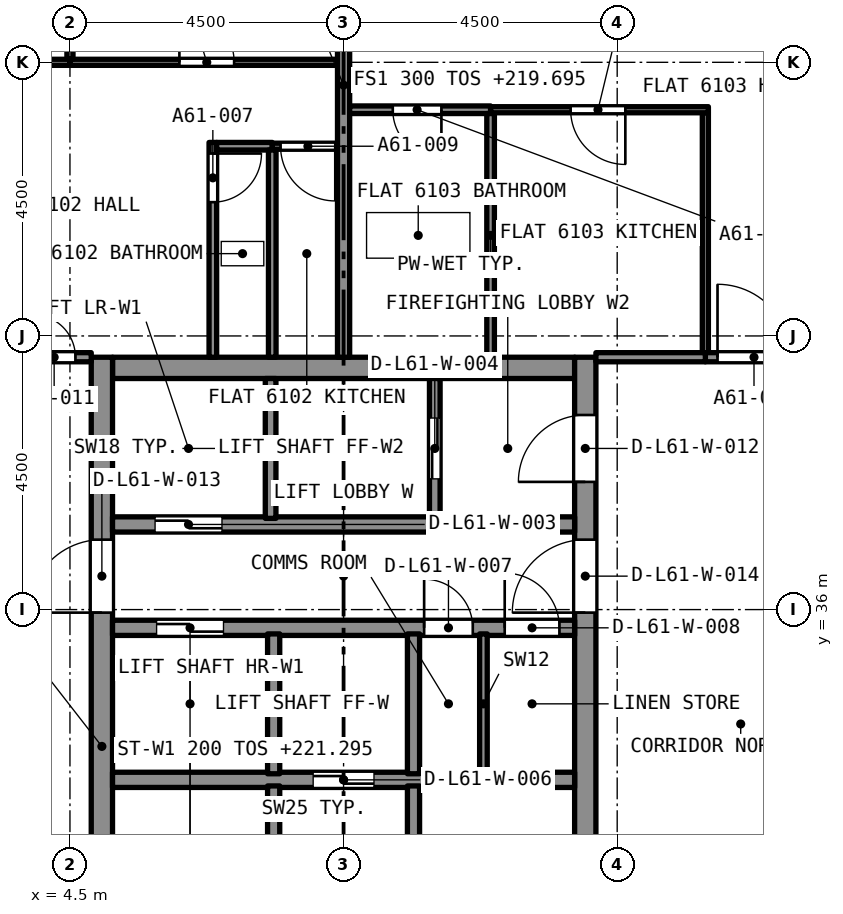
"""IFC4 building model, lengths in metres.
Left out: names, types, materials, properties, quantities, classifications, styles, units other than length and angle.
Written with IfcOpenShell. Run it as: python <this file> out.ifc"""

import sys

from ifc_helpers import new_model, si_unit, direction, frame, frame_2d, origin, place, context, subcontext, project, spatial, rectangle, extrude, element, fill, save


model = new_model("IFC4")
c1 = context("Model", 3, precision=1e-05, world=origin(), true_north=direction((0.0, 1.0)))
c2 = subcontext(c1, "Body", "Model", "MODEL_VIEW")
j1 = project(units=[si_unit("LENGTHUNIT", "METRE"), si_unit("PLANEANGLEUNIT", "RADIAN")], contexts=[c1])
p1 = place(None, origin())
s1 = spatial("IfcSite", under=j1, at=p1, CompositionType="ELEMENT")
p2 = place(p1, origin())
s2 = spatial("IfcBuilding", under=s1, at=p2, CompositionType="ELEMENT")
p3 = place(p2, frame((0.0, 0.0, 219.695)))
s3 = spatial("IfcBuildingStorey", under=s2, at=p3, CompositionType="ELEMENT", Elevation=219.695)
p4 = place(p3, frame((5.2, 39.975, 0.0), z_axis=(0.0, 0.0, 1.0), x_axis=(1.0, 0.0, 0.0)))
e1 = element("IfcWall", 1, at=p4, inside=s3, PredefinedType="SOLIDWALL", context=c2, shape_type="SweptSolid", body=[
    extrude(rectangle(XDim=7.6, YDim=0.35, at=frame_2d((3.8, 0.0))), origin(), (0.0, 0.0, 1.0), 3.2),
])
p5 = place(p3, frame((5.025, 27.35, 0.0), z_axis=(0.0, 0.0, 1.0), x_axis=(0.0, 1.0, 0.0)))
e2 = element("IfcWall", 2, at=p5, inside=s3, PredefinedType="SOLIDWALL", context=c2, shape_type="SweptSolid", body=[
    extrude(rectangle(XDim=12.8, YDim=0.35, at=frame_2d((6.4, 0.0))), origin(), (0.0, 0.0, 1.0), 3.2),
])
p6 = place(p5, frame((8.6, 0.0, 0.0)))
e3 = element("IfcOpeningElement", 3, at=p6, cuts=e2, PredefinedType="OPENING", context=c2, shape_type="SweptSolid", body=[
    extrude(rectangle(XDim=1.2, YDim=2.1, at=frame_2d((0.6, 1.05))), frame((0.0, 0.185, 0.0), z_axis=(0.0, -1.0, 0.0), x_axis=(1.0, 0.0, 0.0)), (0.0, 0.0, 1.0), 0.37),
])
p7 = place(p3, frame((12.975, 27.35, 0.0), z_axis=(0.0, 0.0, 1.0), x_axis=(0.0, 1.0, 0.0)))
e4 = element("IfcWall", 4, at=p7, inside=s3, PredefinedType="SOLIDWALL", context=c2, shape_type="SweptSolid", body=[
    extrude(rectangle(XDim=12.8, YDim=0.35, at=frame_2d((6.4, 0.0))), origin(), (0.0, 0.0, 1.0), 3.2),
])
p8 = place(p7, frame((10.75, 0.0, 0.0)))
e5 = element("IfcOpeningElement", 5, at=p8, cuts=e4, PredefinedType="OPENING", context=c2, shape_type="SweptSolid", body=[
    extrude(rectangle(XDim=1.1, YDim=2.1, at=frame_2d((0.55, 1.05))), frame((0.0, 0.185, 0.0), z_axis=(0.0, -1.0, 0.0), x_axis=(1.0, 0.0, 0.0)), (0.0, 0.0, 1.0), 0.37),
])
p9 = place(p7, frame((8.6, 0.0, 0.0)))
e6 = element("IfcOpeningElement", 6, at=p9, cuts=e4, PredefinedType="OPENING", context=c2, shape_type="SweptSolid", body=[
    extrude(rectangle(XDim=1.2, YDim=2.1, at=frame_2d((0.6, 1.05))), frame((0.0, 0.185, 0.0), z_axis=(0.0, -1.0, 0.0), x_axis=(1.0, 0.0, 0.0)), (0.0, 0.0, 1.0), 0.37),
])
p10 = place(p3, frame((6.85, 43.683, 0.0), z_axis=(0.0, 0.0, 1.0), x_axis=(0.0, -1.0, 0.0)))
e7 = element("IfcWall", 7, at=p10, inside=s3, PredefinedType="PARTITIONING", context=c2, shape_type="SweptSolid", body=[
    extrude(rectangle(XDim=3.533, YDim=0.125, at=frame_2d((1.766, 0.0))), origin(), (0.0, 0.0, 1.0), 2.9),
])
p11 = place(p10, frame((0.183, 0.0, 0.0)))
e8 = element("IfcOpeningElement", 8, at=p11, cuts=e7, PredefinedType="OPENING", context=c2, shape_type="SweptSolid", body=[
    extrude(rectangle(XDim=0.8, YDim=2.1, at=frame_2d((0.4, 1.05))), frame((0.0, 0.073, 0.0), z_axis=(0.0, -1.0, 0.0), x_axis=(1.0, 0.0, 0.0)), (0.0, 0.0, 1.0), 0.145),
])
p12 = place(p3, frame((6.913, 43.62, 0.0), z_axis=(0.0, 0.0, 1.0), x_axis=(1.0, 0.0, 0.0)))
e9 = element("IfcWall", 9, at=p12, inside=s3, PredefinedType="PARTITIONING", context=c2, shape_type="SweptSolid", body=[
    extrude(rectangle(XDim=0.915, YDim=0.125, at=frame_2d((0.458, 0.0))), origin(), (0.0, 0.0, 1.0), 2.9),
])
p13 = place(p3, frame((7.827, 40.15, 0.0), z_axis=(0.0, 0.0, 1.0), x_axis=(0.0, 1.0, 0.0)))
e10 = element("IfcWall", 10, at=p13, inside=s3, PredefinedType="PARTITIONING", context=c2, shape_type="SweptSolid", body=[
    extrude(rectangle(XDim=3.408, YDim=0.125, at=frame_2d((1.704, 0.0))), origin(), (0.0, 0.0, 1.0), 2.9),
])
p14 = place(p3, frame((4.5, 45.0, 0.0), z_axis=(0.0, 0.0, 1.0), x_axis=(1.0, 0.0, 0.0)))
e11 = element("IfcWall", 11, at=p14, inside=s3, PredefinedType="PARTITIONING", context=c2, shape_type="SweptSolid", body=[
    extrude(rectangle(XDim=4.4, YDim=0.1, at=frame_2d((2.2, 0.0))), origin(), (0.0, 0.0, 1.0), 2.9),
])
p15 = place(p14, frame((1.8, 0.0, 0.0)))
e12 = element("IfcOpeningElement", 12, at=p15, cuts=e11, PredefinedType="OPENING", context=c2, shape_type="SweptSolid", body=[
    extrude(rectangle(XDim=0.9, YDim=2.1, at=frame_2d((0.45, 1.05))), frame((0.0, 0.06, 0.0), z_axis=(0.0, -1.0, 0.0), x_axis=(1.0, 0.0, 0.0)), (0.0, 0.0, 1.0), 0.12),
])
p16 = place(p3, frame((4.5, 45.05, 0.0), z_axis=(0.0, 0.0, 1.0), x_axis=(0.0, 1.0, 0.0)))
e13 = element("IfcWall", 13, at=p16, inside=s3, PredefinedType="PARTITIONING", context=c2, shape_type="SweptSolid", body=[
    extrude(rectangle(XDim=4.017, YDim=0.1, at=frame_2d((2.009, 0.0))), origin(), (0.0, 0.0, 1.0), 2.9),
])
p17 = place(p3, frame((8.9, 43.62, 0.0), z_axis=(0.0, 0.0, 1.0), x_axis=(-1.0, 0.0, 0.0)))
e14 = element("IfcWall", 14, at=p17, inside=s3, PredefinedType="PARTITIONING", context=c2, shape_type="SweptSolid", body=[
    extrude(rectangle(XDim=1.073, YDim=0.1, at=frame_2d((0.536, 0.0))), origin(), (0.0, 0.0, 1.0), 2.9),
])
p18 = place(p17, frame((0.036, 0.0, 0.0)))
e15 = element("IfcOpeningElement", 15, at=p18, cuts=e14, PredefinedType="OPENING", context=c2, shape_type="SweptSolid", body=[
    extrude(rectangle(XDim=0.9, YDim=2.1, at=frame_2d((0.45, 1.05))), frame((0.0, 0.06, 0.0), z_axis=(0.0, -1.0, 0.0), x_axis=(1.0, 0.0, 0.0)), (0.0, 0.0, 1.0), 0.12),
])
p19 = place(p3, frame((0.433, 45.0, 0.0), z_axis=(0.0, 0.0, 1.0), x_axis=(1.0, 0.0, 0.0)))
e16 = element("IfcWall", 16, at=p19, inside=s3, PredefinedType="PARTITIONING", context=c2, shape_type="SweptSolid", body=[
    extrude(rectangle(XDim=4.067, YDim=0.1, at=frame_2d((2.034, 0.0))), origin(), (0.0, 0.0, 1.0), 2.9),
])
p20 = place(p19, frame((1.517, 0.0, 0.0)))
e17 = element("IfcOpeningElement", 17, at=p20, cuts=e16, PredefinedType="OPENING", context=c2, shape_type="SweptSolid", body=[
    extrude(rectangle(XDim=1.0, YDim=2.1, at=frame_2d((0.5, 1.05))), frame((0.0, 0.06, 0.0), z_axis=(0.0, -1.0, 0.0), x_axis=(1.0, 0.0, 0.0)), (0.0, 0.0, 1.0), 0.12),
])
p21 = place(p3, frame((3.65, 40.15, 0.0), z_axis=(0.0, 0.0, 1.0), x_axis=(1.0, 0.0, 0.0)))
e18 = element("IfcWall", 18, at=p21, inside=s3, PredefinedType="PARTITIONING", context=c2, shape_type="SweptSolid", body=[
    extrude(rectangle(XDim=1.2, YDim=0.15, at=frame_2d((0.6, 0.0))), origin(), (0.0, 0.0, 1.0), 2.9),
])
p22 = place(p21, frame((0.24, 0.0, 0.0)))
e19 = element("IfcOpeningElement", 19, at=p22, cuts=e18, PredefinedType="OPENING", context=c2, shape_type="SweptSolid", body=[
    extrude(rectangle(XDim=0.7, YDim=2.1, at=frame_2d((0.35, 1.05))), frame((0.0, 0.085, 0.0), z_axis=(0.0, -1.0, 0.0), x_axis=(1.0, 0.0, 0.0)), (0.0, 0.0, 1.0), 0.17),
])
p23 = place(p3, frame((9.0, 40.15, 0.0), z_axis=(0.0, 0.0, 1.0), x_axis=(0.0, 1.0, 0.0)))
e20 = element("IfcWall", 20, at=p23, inside=s3, PredefinedType="PARTITIONING", context=c2, shape_type="SweptSolid", body=[
    extrude(rectangle(XDim=8.95, YDim=0.2, at=frame_2d((4.475, 0.0))), origin(), (0.0, 0.0, 1.0), 2.9),
])
p24 = place(p3, frame((11.418, 44.22, 0.0), z_axis=(0.0, 0.0, 1.0), x_axis=(-1.0, 0.0, 0.0)))
e21 = element("IfcWall", 21, at=p24, inside=s3, PredefinedType="PARTITIONING", context=c2, shape_type="SweptSolid", body=[
    extrude(rectangle(XDim=2.318, YDim=0.125, at=frame_2d((1.159, 0.0))), origin(), (0.0, 0.0, 1.0), 2.9),
])
p25 = place(p24, frame((0.809, 0.0, 0.0)))
e22 = element("IfcOpeningElement", 22, at=p25, cuts=e21, PredefinedType="OPENING", context=c2, shape_type="SweptSolid", body=[
    extrude(rectangle(XDim=0.8, YDim=2.1, at=frame_2d((0.4, 1.05))), frame((0.0, 0.073, 0.0), z_axis=(0.0, -1.0, 0.0), x_axis=(1.0, 0.0, 0.0)), (0.0, 0.0, 1.0), 0.145),
])
p26 = place(p3, frame((11.418, 40.15, 0.0), z_axis=(0.0, 0.0, 1.0), x_axis=(0.0, 1.0, 0.0)))
e23 = element("IfcWall", 23, at=p26, inside=s3, PredefinedType="PARTITIONING", context=c2, shape_type="SweptSolid", body=[
    extrude(rectangle(XDim=4.008, YDim=0.125, at=frame_2d((2.004, 0.0))), origin(), (0.0, 0.0, 1.0), 2.9),
])
p27 = place(p3, frame((14.95, 40.225, 0.0), z_axis=(0.0, 0.0, 1.0), x_axis=(0.0, 1.0, 0.0)))
e24 = element("IfcWall", 24, at=p27, inside=s3, PredefinedType="PARTITIONING", context=c2, shape_type="SweptSolid", body=[
    extrude(rectangle(XDim=3.945, YDim=0.1, at=frame_2d((1.972, 0.0))), origin(), (0.0, 0.0, 1.0), 2.9),
])
p28 = place(p3, frame((15.0, 44.22, 0.0), z_axis=(0.0, 0.0, 1.0), x_axis=(-1.0, 0.0, 0.0)))
e25 = element("IfcWall", 25, at=p28, inside=s3, PredefinedType="PARTITIONING", context=c2, shape_type="SweptSolid", body=[
    extrude(rectangle(XDim=3.582, YDim=0.1, at=frame_2d((1.791, 0.0))), origin(), (0.0, 0.0, 1.0), 2.9),
])
p29 = place(p28, frame((1.366, 0.0, 0.0)))
e26 = element("IfcOpeningElement", 26, at=p29, cuts=e25, PredefinedType="OPENING", context=c2, shape_type="SweptSolid", body=[
    extrude(rectangle(XDim=0.9, YDim=2.1, at=frame_2d((0.45, 1.05))), frame((0.0, 0.06, 0.0), z_axis=(0.0, -1.0, 0.0), x_axis=(1.0, 0.0, 0.0)), (0.0, 0.0, 1.0), 0.12),
])
p30 = place(p3, frame((14.95, 40.15, 0.0), z_axis=(0.0, 0.0, 1.0), x_axis=(1.0, 0.0, 0.0)))
e27 = element("IfcWall", 27, at=p30, inside=s3, PredefinedType="PARTITIONING", context=c2, shape_type="SweptSolid", body=[
    extrude(rectangle(XDim=2.65, YDim=0.15, at=frame_2d((1.325, 0.0))), origin(), (0.0, 0.0, 1.0), 2.9),
])
p31 = place(p30, frame((0.2, 0.0, 0.0)))
e28 = element("IfcOpeningElement", 28, at=p31, cuts=e27, PredefinedType="OPENING", context=c2, shape_type="SweptSolid", body=[
    extrude(rectangle(XDim=1.2, YDim=2.4, at=frame_2d((0.6, 1.2))), frame((0.0, 0.085, 0.0), z_axis=(0.0, -1.0, 0.0), x_axis=(1.0, 0.0, 0.0)), (0.0, 0.0, 1.0), 0.17),
])
p32 = place(p3, frame((13.15, 40.15, 0.0), z_axis=(0.0, 0.0, 1.0), x_axis=(1.0, 0.0, 0.0)))
e29 = element("IfcWall", 29, at=p32, inside=s3, PredefinedType="PARTITIONING", context=c2, shape_type="SweptSolid", body=[
    extrude(rectangle(XDim=1.8, YDim=0.15, at=frame_2d((0.9, 0.0))), origin(), (0.0, 0.0, 1.0), 2.9),
])
p33 = place(p3, frame((5.2, 33.2, 0.0), z_axis=(0.0, 0.0, 1.0), x_axis=(1.0, 0.0, 0.0)))
e30 = element("IfcWall", 30, at=p33, inside=s3, PredefinedType="SOLIDWALL", context=c2, shape_type="SweptSolid", body=[
    extrude(rectangle(XDim=7.6, YDim=0.25, at=frame_2d((3.8, 0.0))), origin(), (0.0, 0.0, 1.0), 2.9),
])
p34 = place(p33, frame((3.3, 0.0, 0.0)))
e31 = element("IfcOpeningElement", 31, at=p34, cuts=e30, PredefinedType="OPENING", context=c2, shape_type="SweptSolid", body=[
    extrude(rectangle(XDim=1.0, YDim=2.1, at=frame_2d((0.5, 1.05))), frame((0.0, 0.135, 0.0), z_axis=(0.0, -1.0, 0.0), x_axis=(1.0, 0.0, 0.0)), (0.0, 0.0, 1.0), 0.27),
])
p35 = place(p3, frame((5.2, 35.7, 0.0), z_axis=(0.0, 0.0, 1.0), x_axis=(1.0, 0.0, 0.0)))
e32 = element("IfcWall", 32, at=p35, inside=s3, PredefinedType="SOLIDWALL", context=c2, shape_type="SweptSolid", body=[
    extrude(rectangle(XDim=7.6, YDim=0.25, at=frame_2d((3.8, 0.0))), origin(), (0.0, 0.0, 1.0), 2.9),
])
p36 = place(p35, frame((0.725, 0.0, 0.0)))
e33 = element("IfcOpeningElement", 33, at=p36, cuts=e32, PredefinedType="OPENING", context=c2, shape_type="SweptSolid", body=[
    extrude(rectangle(XDim=1.1, YDim=2.4, at=frame_2d((0.55, 1.2))), frame((0.0, 0.135, 0.0), z_axis=(0.0, -1.0, 0.0), x_axis=(1.0, 0.0, 0.0)), (0.0, 0.0, 1.0), 0.27),
])
p37 = place(p35, frame((5.125, 0.0, 0.0)))
e34 = element("IfcOpeningElement", 34, at=p37, cuts=e32, PredefinedType="OPENING", context=c2, shape_type="SweptSolid", body=[
    extrude(rectangle(XDim=0.8, YDim=2.1, at=frame_2d((0.4, 1.05))), frame((0.0, 0.135, 0.0), z_axis=(0.0, -1.0, 0.0), x_axis=(1.0, 0.0, 0.0)), (0.0, 0.0, 1.0), 0.27),
])
p38 = place(p35, frame((6.45, 0.0, 0.0)))
e35 = element("IfcOpeningElement", 35, at=p38, cuts=e32, PredefinedType="OPENING", context=c2, shape_type="SweptSolid", body=[
    extrude(rectangle(XDim=0.9, YDim=2.1, at=frame_2d((0.45, 1.05))), frame((0.0, 0.135, 0.0), z_axis=(0.0, -1.0, 0.0), x_axis=(1.0, 0.0, 0.0)), (0.0, 0.0, 1.0), 0.27),
])
p39 = place(p3, frame((5.2, 37.4, 0.0), z_axis=(0.0, 0.0, 1.0), x_axis=(1.0, 0.0, 0.0)))
e36 = element("IfcWall", 36, at=p39, inside=s3, PredefinedType="SOLIDWALL", context=c2, shape_type="SweptSolid", body=[
    extrude(rectangle(XDim=7.6, YDim=0.25, at=frame_2d((3.8, 0.0))), origin(), (0.0, 0.0, 1.0), 2.9),
])
p40 = place(p39, frame((0.7, 0.0, 0.0)))
e37 = element("IfcOpeningElement", 37, at=p40, cuts=e36, PredefinedType="OPENING", context=c2, shape_type="SweptSolid", body=[
    extrude(rectangle(XDim=1.1, YDim=2.4, at=frame_2d((0.55, 1.2))), frame((0.0, 0.135, 0.0), z_axis=(0.0, -1.0, 0.0), x_axis=(1.0, 0.0, 0.0)), (0.0, 0.0, 1.0), 0.27),
])
p41 = place(p3, frame((7.85, 27.7, 0.0), z_axis=(0.0, 0.0, 1.0), x_axis=(0.0, 1.0, 0.0)))
e38 = element("IfcWall", 38, at=p41, inside=s3, PredefinedType="SOLIDWALL", context=c2, shape_type="SweptSolid", body=[
    extrude(rectangle(XDim=5.4, YDim=0.2, at=frame_2d((2.7, 0.0))), origin(), (0.0, 0.0, 1.0), 2.9),
])
p42 = place(p41, frame((0.2, 0.0, 0.0)))
e39 = element("IfcOpeningElement", 39, at=p42, cuts=e38, PredefinedType="OPENING", context=c2, shape_type="SweptSolid", body=[
    extrude(rectangle(XDim=0.9, YDim=2.1, at=frame_2d((0.45, 1.05))), frame((0.0, 0.11, 0.0), z_axis=(0.0, -1.0, 0.0), x_axis=(1.0, 0.0, 0.0)), (0.0, 0.0, 1.0), 0.22),
])
p43 = place(p3, frame((10.15, 27.7, 0.0), z_axis=(0.0, 0.0, 1.0), x_axis=(0.0, 1.0, 0.0)))
e40 = element("IfcWall", 40, at=p43, inside=s3, PredefinedType="SOLIDWALL", context=c2, shape_type="SweptSolid", body=[
    extrude(rectangle(XDim=5.4, YDim=0.2, at=frame_2d((2.7, 0.0))), origin(), (0.0, 0.0, 1.0), 2.9),
])
p44 = place(p43, frame((0.2, 0.0, 0.0)))
e41 = element("IfcOpeningElement", 41, at=p44, cuts=e40, PredefinedType="OPENING", context=c2, shape_type="SweptSolid", body=[
    extrude(rectangle(XDim=0.9, YDim=2.1, at=frame_2d((0.45, 1.05))), frame((0.0, 0.11, 0.0), z_axis=(0.0, -1.0, 0.0), x_axis=(1.0, 0.0, 0.0)), (0.0, 0.0, 1.0), 0.22),
])
for number, where, z_axis, x_axis in (
    (42, (7.85, 33.3, 0.0), (0.0, 0.0, 1.0), (0.0, 1.0, 0.0)),
    (43, (10.15, 33.3, 0.0), (0.0, 0.0, 1.0), (0.0, 1.0, 0.0)),
):
    element("IfcWall", number, at=place(p3, frame(where, z_axis=z_axis, x_axis=x_axis)), inside=s3, PredefinedType="SOLIDWALL", context=c2, shape_type="SweptSolid", body=[
        extrude(rectangle(XDim=2.3, YDim=0.2, at=frame_2d((1.15, 0.0))), origin(), (0.0, 0.0, 1.0), 2.9),
    ])
p45 = place(p3, frame((7.8, 37.5, 0.0), z_axis=(0.0, 0.0, 1.0), x_axis=(0.0, 1.0, 0.0)))
e44 = element("IfcWall", 44, at=p45, inside=s3, PredefinedType="SOLIDWALL", context=c2, shape_type="SweptSolid", body=[
    extrude(rectangle(XDim=2.3, YDim=0.175, at=frame_2d((1.15, 0.0))), origin(), (0.0, 0.0, 1.0), 2.9),
])
p46 = place(p3, frame((10.5, 37.5, 0.0), z_axis=(0.0, 0.0, 1.0), x_axis=(0.0, 1.0, 0.0)))
e45 = element("IfcWall", 45, at=p46, inside=s3, PredefinedType="SOLIDWALL", context=c2, shape_type="SweptSolid", body=[
    extrude(rectangle(XDim=2.3, YDim=0.175, at=frame_2d((1.15, 0.0))), origin(), (0.0, 0.0, 1.0), 2.9),
])
p47 = place(p46, frame((0.65, 0.0, 0.0)))
e46 = element("IfcOpeningElement", 46, at=p47, cuts=e45, PredefinedType="OPENING", context=c2, shape_type="SweptSolid", body=[
    extrude(rectangle(XDim=1.0, YDim=2.1, at=frame_2d((0.5, 1.05))), frame((0.0, 0.097, 0.0), z_axis=(0.0, -1.0, 0.0), x_axis=(1.0, 0.0, 0.0)), (0.0, 0.0, 1.0), 0.195),
])
p48 = place(p3, frame((11.3, 33.3, 0.0), z_axis=(0.0, 0.0, 1.0), x_axis=(0.0, 1.0, 0.0)))
e47 = element("IfcWall", 47, at=p48, inside=s3, PredefinedType="PARTITIONING", context=c2, shape_type="SweptSolid", body=[
    extrude(rectangle(XDim=2.3, YDim=0.125, at=frame_2d((1.15, 0.0))), origin(), (0.0, 0.0, 1.0), 2.9),
])
p49 = place(p11, origin())
e48 = element("IfcDoor", 48, at=p49, inside=s3, OperationType="SINGLE_SWING_LEFT", PredefinedType="DOOR", context=c2, shape_type="SweptSolid", body=[
    extrude(rectangle(XDim=0.8, YDim=2.1, at=frame_2d((0.4, 1.05))), frame((0.0, 0.025, 0.0), z_axis=(0.0, -1.0, 0.0), x_axis=(1.0, 0.0, 0.0)), (0.0, 0.0, 1.0), 0.05),
])
fill(e8, e48)
p50 = place(p15, origin())
e49 = element("IfcDoor", 49, at=p50, inside=s3, OperationType="SINGLE_SWING_RIGHT", PredefinedType="DOOR", context=c2, shape_type="SweptSolid", body=[
    extrude(rectangle(XDim=0.9, YDim=2.1, at=frame_2d((0.45, 1.05))), frame((0.0, 0.025, 0.0), z_axis=(0.0, -1.0, 0.0), x_axis=(1.0, 0.0, 0.0)), (0.0, 0.0, 1.0), 0.05),
])
fill(e12, e49)
p51 = place(p18, origin())
e50 = element("IfcDoor", 50, at=p51, inside=s3, OperationType="SINGLE_SWING_LEFT", PredefinedType="DOOR", context=c2, shape_type="SweptSolid", body=[
    extrude(rectangle(XDim=0.9, YDim=2.1, at=frame_2d((0.45, 1.05))), frame((0.0, 0.025, 0.0), z_axis=(0.0, -1.0, 0.0), x_axis=(1.0, 0.0, 0.0)), (0.0, 0.0, 1.0), 0.05),
])
fill(e15, e50)
p52 = place(p22, origin())
e51 = element("IfcDoor", 51, at=p52, inside=s3, OperationType="SINGLE_SWING_LEFT", PredefinedType="DOOR", context=c2, shape_type="SweptSolid", body=[
    extrude(rectangle(XDim=0.7, YDim=2.1, at=frame_2d((0.35, 1.05))), frame((0.0, 0.025, 0.0), z_axis=(0.0, -1.0, 0.0), x_axis=(1.0, 0.0, 0.0)), (0.0, 0.0, 1.0), 0.05),
])
fill(e19, e51)
p53 = place(p25, origin())
e52 = element("IfcDoor", 52, at=p53, inside=s3, OperationType="SINGLE_SWING_RIGHT", PredefinedType="DOOR", context=c2, shape_type="SweptSolid", body=[
    extrude(rectangle(XDim=0.8, YDim=2.1, at=frame_2d((0.4, 1.05))), frame((0.0, 0.025, 0.0), z_axis=(0.0, -1.0, 0.0), x_axis=(1.0, 0.0, 0.0)), (0.0, 0.0, 1.0), 0.05),
])
fill(e22, e52)
p54 = place(p29, origin())
e53 = element("IfcDoor", 53, at=p54, inside=s3, OperationType="SINGLE_SWING_RIGHT", PredefinedType="DOOR", context=c2, shape_type="SweptSolid", body=[
    extrude(rectangle(XDim=0.9, YDim=2.1, at=frame_2d((0.45, 1.05))), frame((0.0, 0.025, 0.0), z_axis=(0.0, -1.0, 0.0), x_axis=(1.0, 0.0, 0.0)), (0.0, 0.0, 1.0), 0.05),
])
fill(e26, e53)
p55 = place(p31, origin())
e54 = element("IfcDoor", 54, at=p55, inside=s3, OperationType="SINGLE_SWING_LEFT", PredefinedType="DOOR", context=c2, shape_type="SweptSolid", body=[
    extrude(rectangle(XDim=1.2, YDim=2.4, at=frame_2d((0.6, 1.2))), frame((0.0, 0.025, 0.0), z_axis=(0.0, -1.0, 0.0), x_axis=(1.0, 0.0, 0.0)), (0.0, 0.0, 1.0), 0.05),
])
fill(e28, e54)
p56 = place(p40, origin())
e55 = element("IfcDoor", 55, at=p56, inside=s3, OperationType="SLIDING_TO_LEFT", PredefinedType="DOOR", context=c2, shape_type="SweptSolid", body=[
    extrude(rectangle(XDim=1.1, YDim=2.4, at=frame_2d((0.55, 1.2))), frame((0.0, 0.025, 0.0), z_axis=(0.0, -1.0, 0.0), x_axis=(1.0, 0.0, 0.0)), (0.0, 0.0, 1.0), 0.05),
])
fill(e37, e55)
p57 = place(p47, origin())
e56 = element("IfcDoor", 56, at=p57, inside=s3, OperationType="SLIDING_TO_LEFT", PredefinedType="DOOR", context=c2, shape_type="SweptSolid", body=[
    extrude(rectangle(XDim=1.0, YDim=2.1, at=frame_2d((0.5, 1.05))), frame((0.0, 0.025, 0.0), z_axis=(0.0, -1.0, 0.0), x_axis=(1.0, 0.0, 0.0)), (0.0, 0.0, 1.0), 0.05),
])
fill(e46, e56)
p58 = place(p36, origin())
e57 = element("IfcDoor", 57, at=p58, inside=s3, OperationType="SLIDING_TO_LEFT", PredefinedType="DOOR", context=c2, shape_type="SweptSolid", body=[
    extrude(rectangle(XDim=1.1, YDim=2.4, at=frame_2d((0.55, 1.2))), frame((0.0, 0.025, 0.0), z_axis=(0.0, -1.0, 0.0), x_axis=(1.0, 0.0, 0.0)), (0.0, 0.0, 1.0), 0.05),
])
fill(e33, e57)
p59 = place(p34, origin())
e58 = element("IfcDoor", 58, at=p59, inside=s3, OperationType="SLIDING_TO_LEFT", PredefinedType="DOOR", context=c2, shape_type="SweptSolid", body=[
    extrude(rectangle(XDim=1.0, YDim=2.1, at=frame_2d((0.5, 1.05))), frame((0.0, 0.025, 0.0), z_axis=(0.0, -1.0, 0.0), x_axis=(1.0, 0.0, 0.0)), (0.0, 0.0, 1.0), 0.05),
])
fill(e31, e58)
p60 = place(p37, origin())
e59 = element("IfcDoor", 59, at=p60, inside=s3, OperationType="SINGLE_SWING_LEFT", PredefinedType="DOOR", context=c2, shape_type="SweptSolid", body=[
    extrude(rectangle(XDim=0.8, YDim=2.1, at=frame_2d((0.4, 1.05))), frame((0.0, 0.025, 0.0), z_axis=(0.0, -1.0, 0.0), x_axis=(1.0, 0.0, 0.0)), (0.0, 0.0, 1.0), 0.05),
])
fill(e34, e59)
p61 = place(p38, origin())
e60 = element("IfcDoor", 60, at=p61, inside=s3, OperationType="SINGLE_SWING_LEFT", PredefinedType="DOOR", context=c2, shape_type="SweptSolid", body=[
    extrude(rectangle(XDim=0.9, YDim=2.1, at=frame_2d((0.45, 1.05))), frame((0.0, 0.025, 0.0), z_axis=(0.0, -1.0, 0.0), x_axis=(1.0, 0.0, 0.0)), (0.0, 0.0, 1.0), 0.05),
])
fill(e35, e60)
p62 = place(p8, origin())
e61 = element("IfcDoor", 61, at=p62, inside=s3, OperationType="SINGLE_SWING_LEFT", PredefinedType="DOOR", context=c2, shape_type="SweptSolid", body=[
    extrude(rectangle(XDim=1.1, YDim=2.1, at=frame_2d((0.55, 1.05))), frame((0.0, 0.025, 0.0), z_axis=(0.0, -1.0, 0.0), x_axis=(1.0, 0.0, 0.0)), (0.0, 0.0, 1.0), 0.05),
])
fill(e5, e61)
p63 = place(p6, origin())
e62 = element("IfcDoor", 62, at=p63, inside=s3, OperationType="SINGLE_SWING_LEFT", PredefinedType="DOOR", context=c2, shape_type="SweptSolid", body=[
    extrude(rectangle(XDim=1.2, YDim=2.1, at=frame_2d((0.6, 1.05))), frame((0.0, 0.025, 0.0), z_axis=(0.0, -1.0, 0.0), x_axis=(1.0, 0.0, 0.0)), (0.0, 0.0, 1.0), 0.05),
])
fill(e3, e62)
p64 = place(p9, origin())
e63 = element("IfcDoor", 63, at=p64, inside=s3, OperationType="SINGLE_SWING_LEFT", PredefinedType="DOOR", context=c2, shape_type="SweptSolid", body=[
    extrude(rectangle(XDim=1.2, YDim=2.1, at=frame_2d((0.6, 1.05))), frame((0.0, 0.025, 0.0), z_axis=(0.0, -1.0, 0.0), x_axis=(1.0, 0.0, 0.0)), (0.0, 0.0, 1.0), 0.05),
])
fill(e6, e63)
save(model, sys.argv[1])
